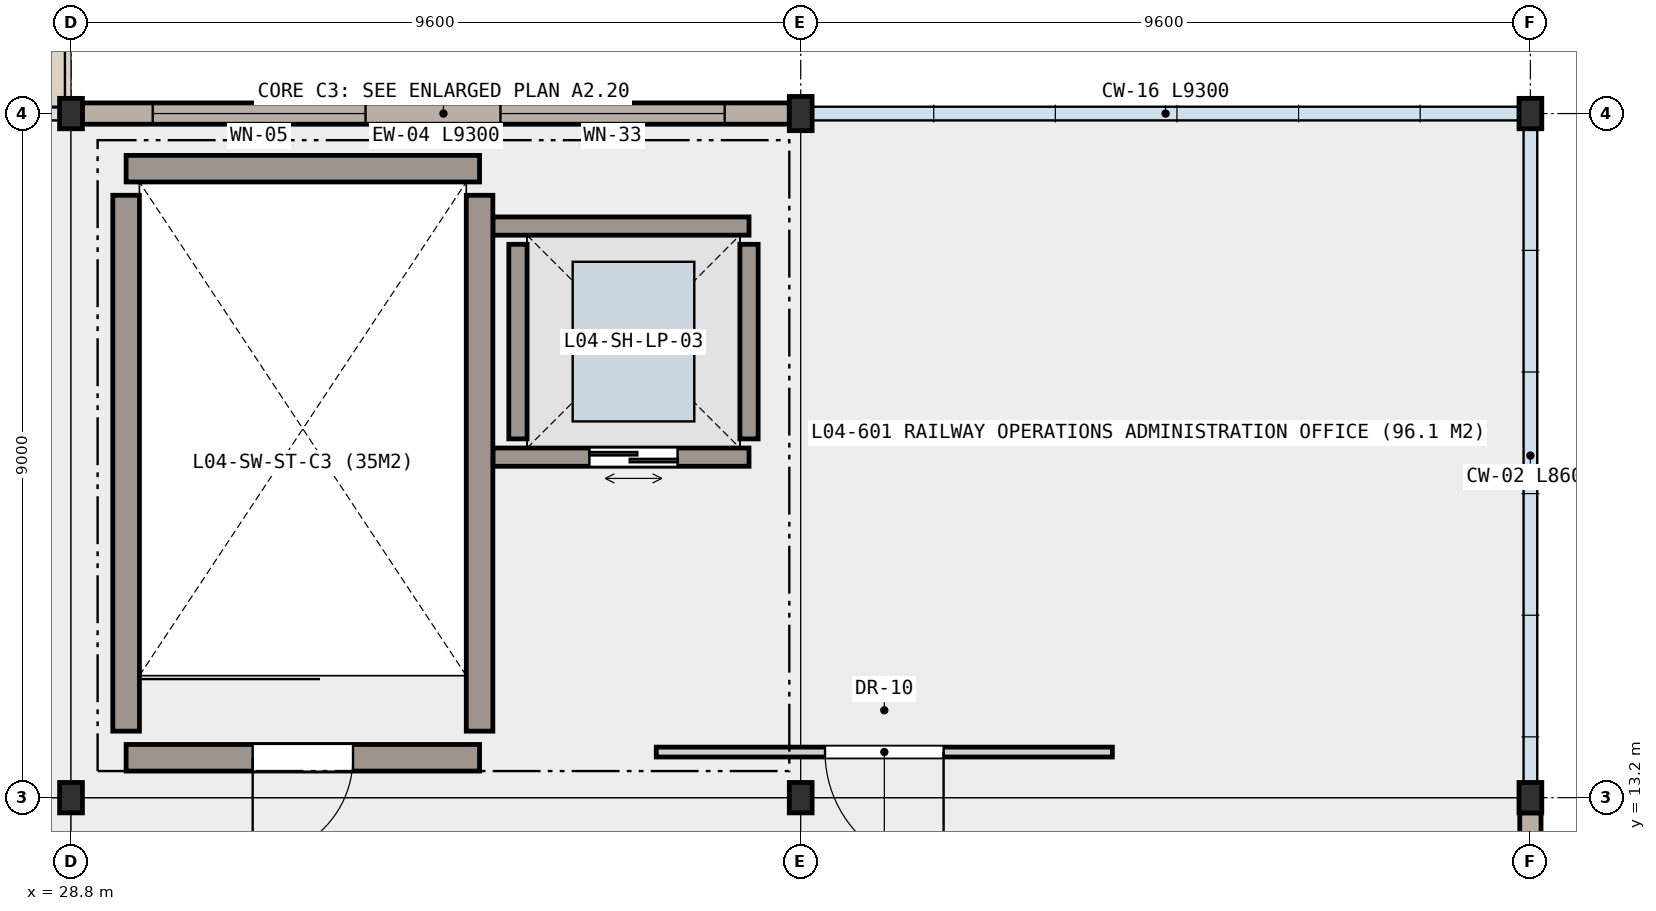
"""IFC4 building model, lengths in metres.
Left out: names, types, materials, properties, quantities, classifications, styles, units other than length and angle.
Written with IfcOpenShell. Run it as: python <this file> out.ifc"""

import sys

from ifc_helpers import new_model, si_unit, direction, frame, frame_2d, origin, origin_2d, place, context, subcontext, project, spatial, rectangle, i_section, extrude, element, fill, save


model = new_model("IFC4")
c1 = context("Model", 3, precision=1e-05, world=origin(), true_north=direction((0.0, 1.0)))
c2 = subcontext(c1, "Body", "Model", "MODEL_VIEW")
j1 = project(units=[si_unit("LENGTHUNIT", "METRE"), si_unit("PLANEANGLEUNIT", "RADIAN")], contexts=[c1])
p1 = place(None, origin())
s1 = spatial("IfcSite", under=j1, at=p1, CompositionType="ELEMENT")
p2 = place(p1, origin())
s2 = spatial("IfcBuilding", under=s1, at=p2, CompositionType="ELEMENT")
p3 = place(p2, frame((0.0, 0.0, 18.6)))
s3 = spatial("IfcBuildingStorey", under=s2, at=p3, CompositionType="ELEMENT", Elevation=18.6)
for number, where, z_axis, x_axis in (
    (1, (28.8, 13.2, 0.0), (0.0, 0.0, 1.0), (1.0, 0.0, 0.0)),
    (2, (28.8, 22.2, 0.0), (0.0, 0.0, 1.0), (1.0, 0.0, 0.0)),
    (3, (38.4, 13.2, 0.0), (0.0, 0.0, 1.0), (1.0, 0.0, 0.0)),
):
    element("IfcColumn", number, at=place(p3, frame(where, z_axis=z_axis, x_axis=x_axis)), inside=s3, PredefinedType="COLUMN", context=c2, shape_type="SweptSolid", body=[
        extrude(i_section(OverallWidth=0.3, OverallDepth=0.4, WebThickness=0.013, FlangeThickness=0.024, FilletRadius=0.027, at=origin_2d()), origin(), (0.0, 0.0, 1.0), 4.2),
    ])
p4 = place(p3, frame((38.4, 22.2, 0.0), z_axis=(0.0, 0.0, 1.0), x_axis=(1.0, 0.0, 0.0)))
e4 = element("IfcColumn", 4, at=p4, inside=s3, PredefinedType="COLUMN", context=c2, shape_type="SweptSolid", body=[
    extrude(i_section(OverallWidth=0.3, OverallDepth=0.45, WebThickness=0.014, FlangeThickness=0.026, FilletRadius=0.027, at=origin_2d()), origin(), (0.0, 0.0, 1.0), 4.2),
])
for number, where, z_axis, x_axis in (
    (5, (48.0, 13.2, 0.0), (0.0, 0.0, 1.0), (1.0, 0.0, 0.0)),
    (6, (48.0, 22.2, 0.0), (0.0, 0.0, 1.0), (1.0, 0.0, 0.0)),
):
    element("IfcColumn", number, at=place(p3, frame(where, z_axis=z_axis, x_axis=x_axis)), inside=s3, PredefinedType="COLUMN", context=c2, shape_type="SweptSolid", body=[
        extrude(i_section(OverallWidth=0.3, OverallDepth=0.4, WebThickness=0.013, FlangeThickness=0.024, FilletRadius=0.027, at=origin_2d()), origin(), (0.0, 0.0, 1.0), 4.2),
    ])
p5 = place(p3, frame((28.95, 22.2, 0.0), z_axis=(0.0, 0.0, 1.0), x_axis=(1.0, 0.0, 0.0)))
e7 = element("IfcWall", 7, at=p5, inside=s3, PredefinedType="SOLIDWALL", context=c2, shape_type="SweptSolid", body=[
    extrude(rectangle(XDim=9.3, YDim=0.28, at=frame_2d((4.65, 0.0))), origin(), (0.0, 0.0, 1.0), 3.33),
])
p6 = place(p5, frame((0.925, 0.0, 0.85)))
e8 = element("IfcOpeningElement", 8, at=p6, cuts=e7, PredefinedType="OPENING", context=c2, shape_type="SweptSolid", body=[
    extrude(rectangle(XDim=2.8, YDim=2.15, at=frame_2d((1.4, 1.075))), frame((0.0, 0.15, 0.0), z_axis=(0.0, -1.0, 0.0), x_axis=(1.0, 0.0, 0.0)), (0.0, 0.0, 1.0), 0.3),
])
p7 = place(p5, frame((5.5, 0.0, 0.85)))
e9 = element("IfcOpeningElement", 9, at=p7, cuts=e7, PredefinedType="OPENING", context=c2, shape_type="SweptSolid", body=[
    extrude(rectangle(XDim=2.95, YDim=1.5, at=frame_2d((1.475, 0.75))), frame((0.0, 0.15, 0.0), z_axis=(0.0, -1.0, 0.0), x_axis=(1.0, 0.0, 0.0)), (0.0, 0.0, 1.0), 0.3),
])
p8 = place(p3, frame((48.0, 13.0, 0.0), z_axis=(0.0, 0.0, 1.0), x_axis=(0.0, -1.0, 0.0)))
e10 = element("IfcWall", 10, at=p8, inside=s3, PredefinedType="SOLIDWALL", context=c2, shape_type="SweptSolid", body=[
    extrude(rectangle(XDim=6.2, YDim=0.28, at=frame_2d((3.1, 0.0))), origin(), (0.0, 0.0, 1.0), 3.57),
])
p9 = place(p8, frame((1.625, 0.0, 0.85)))
e11 = element("IfcOpeningElement", 11, at=p9, cuts=e10, PredefinedType="OPENING", context=c2, shape_type="SweptSolid", body=[
    extrude(rectangle(XDim=2.95, YDim=1.85, at=frame_2d((1.475, 0.925))), frame((0.0, 0.15, 0.0), z_axis=(0.0, -1.0, 0.0), x_axis=(1.0, 0.0, 0.0)), (0.0, 0.0, 1.0), 0.3),
])
p10 = place(p3, frame((37.72, 17.68, 0.0), z_axis=(0.0, 0.0, 1.0), x_axis=(-1.0, 0.0, 0.0)))
e12 = element("IfcWall", 12, at=p10, inside=s3, PredefinedType="SHEAR", context=c2, shape_type="SweptSolid", body=[
    extrude(rectangle(XDim=3.37, YDim=0.24, at=frame_2d((1.685, 0.0))), origin(), (0.0, 0.0, 1.0), 3.96),
])
p11 = place(p10, frame((0.94, 0.0, 0.0)))
e13 = element("IfcOpeningElement", 13, at=p11, cuts=e12, PredefinedType="OPENING", context=c2, shape_type="SweptSolid", body=[
    extrude(rectangle(XDim=1.16, YDim=2.15, at=frame_2d((0.58, 1.075))), frame((0.0, 0.13, 0.0), z_axis=(0.0, -1.0, 0.0), x_axis=(1.0, 0.0, 0.0)), (0.0, 0.0, 1.0), 0.26),
])
p12 = place(p3, frame((34.35, 20.72, 0.0), z_axis=(0.0, 0.0, 1.0), x_axis=(1.0, 0.0, 0.0)))
e14 = element("IfcWall", 14, at=p12, inside=s3, PredefinedType="SHEAR", context=c2, shape_type="SweptSolid", body=[
    extrude(rectangle(XDim=3.37, YDim=0.24, at=frame_2d((1.685, 0.0))), origin(), (0.0, 0.0, 1.0), 3.96),
])
for number, where, z_axis, x_axis in (
    (15, (34.68, 17.92, 0.0), (0.0, 0.0, 1.0), (0.0, 1.0, 0.0)),
    (16, (37.72, 20.48, 0.0), (0.0, 0.0, 1.0), (0.0, -1.0, 0.0)),
):
    element("IfcWall", number, at=place(p3, frame(where, z_axis=z_axis, x_axis=x_axis)), inside=s3, PredefinedType="SHEAR", context=c2, shape_type="SweptSolid", body=[
        extrude(rectangle(XDim=2.56, YDim=0.24, at=frame_2d((1.28, 0.0))), origin(), (0.0, 0.0, 1.0), 3.96),
    ])
p13 = place(p3, frame((34.175, 13.725, 0.0), z_axis=(0.0, 0.0, 1.0), x_axis=(-1.0, 0.0, 0.0)))
e17 = element("IfcWall", 17, at=p13, inside=s3, PredefinedType="SHEAR", context=c2, shape_type="SweptSolid", body=[
    extrude(rectangle(XDim=4.65, YDim=0.35, at=frame_2d((2.325, 0.0))), origin(), (0.0, 0.0, 1.0), 3.96),
])
p14 = place(p13, frame((1.665, 0.0, 0.0)))
e18 = element("IfcOpeningElement", 18, at=p14, cuts=e17, PredefinedType="OPENING", context=c2, shape_type="SweptSolid", body=[
    extrude(rectangle(XDim=1.32, YDim=2.15, at=frame_2d((0.66, 1.075))), frame((0.0, 0.185, 0.0), z_axis=(0.0, -1.0, 0.0), x_axis=(1.0, 0.0, 0.0)), (0.0, 0.0, 1.0), 0.37),
])
p15 = place(p3, frame((29.525, 21.475, 0.0), z_axis=(0.0, 0.0, 1.0), x_axis=(1.0, 0.0, 0.0)))
e19 = element("IfcWall", 19, at=p15, inside=s3, PredefinedType="SHEAR", context=c2, shape_type="SweptSolid", body=[
    extrude(rectangle(XDim=4.65, YDim=0.35, at=frame_2d((2.325, 0.0))), origin(), (0.0, 0.0, 1.0), 3.96),
])
for number, where, z_axis, x_axis in (
    (20, (29.525, 14.075, 0.0), (0.0, 0.0, 1.0), (0.0, 1.0, 0.0)),
    (21, (34.175, 21.125, 0.0), (0.0, 0.0, 1.0), (0.0, -1.0, 0.0)),
):
    element("IfcWall", number, at=place(p3, frame(where, z_axis=z_axis, x_axis=x_axis)), inside=s3, PredefinedType="SHEAR", context=c2, shape_type="SweptSolid", body=[
        extrude(rectangle(XDim=7.05, YDim=0.35, at=frame_2d((3.525, 0.0))), origin(), (0.0, 0.0, 1.0), 3.96),
    ])
p16 = place(p3, frame((42.5, 13.8, 0.0), z_axis=(0.0, 0.0, 1.0), x_axis=(-1.0, 0.0, 0.0)))
e22 = element("IfcWall", 22, at=p16, inside=s3, PredefinedType="PARTITIONING", context=c2, shape_type="SweptSolid", body=[
    extrude(rectangle(XDim=6.0, YDim=0.13, at=frame_2d((3.0, 0.0))), origin(), (0.0, 0.0, 1.0), 3.96),
])
p17 = place(p16, frame((2.22, 0.0, 0.0)))
e23 = element("IfcOpeningElement", 23, at=p17, cuts=e22, PredefinedType="OPENING", context=c2, shape_type="SweptSolid", body=[
    extrude(rectangle(XDim=1.56, YDim=2.2, at=frame_2d((0.78, 1.1))), frame((0.0, 0.075, 0.0), z_axis=(0.0, -1.0, 0.0), x_axis=(1.0, 0.0, 0.0)), (0.0, 0.0, 1.0), 0.15),
])
p18 = place(p6, origin())
e24 = element("IfcWindow", 24, at=p18, inside=s3, PartitioningType="SINGLE_PANEL", PredefinedType="WINDOW", context=c2, shape_type="SweptSolid", body=[
    extrude(rectangle(XDim=2.8, YDim=2.15, at=frame_2d((1.4, 1.075))), frame((0.0, 0.03, 0.0), z_axis=(0.0, -1.0, 0.0), x_axis=(1.0, 0.0, 0.0)), (0.0, 0.0, 1.0), 0.06),
])
fill(e8, e24)
p19 = place(p7, origin())
e25 = element("IfcWindow", 25, at=p19, inside=s3, PartitioningType="SINGLE_PANEL", PredefinedType="WINDOW", context=c2, shape_type="SweptSolid", body=[
    extrude(rectangle(XDim=2.95, YDim=1.5, at=frame_2d((1.475, 0.75))), frame((0.0, 0.03, 0.0), z_axis=(0.0, -1.0, 0.0), x_axis=(1.0, 0.0, 0.0)), (0.0, 0.0, 1.0), 0.06),
])
fill(e9, e25)
p20 = place(p11, origin())
e26 = element("IfcDoor", 26, at=p20, inside=s3, OperationType="DOUBLE_DOOR_SLIDING", PredefinedType="DOOR", context=c2, shape_type="SweptSolid", body=[
    extrude(rectangle(XDim=1.16, YDim=2.15, at=frame_2d((0.58, 1.075))), frame((0.0, 0.025, 0.0), z_axis=(0.0, -1.0, 0.0), x_axis=(1.0, 0.0, 0.0)), (0.0, 0.0, 1.0), 0.05),
])
fill(e13, e26)
p21 = place(p14, origin())
e27 = element("IfcDoor", 27, at=p21, inside=s3, OperationType="SINGLE_SWING_RIGHT", PredefinedType="DOOR", context=c2, shape_type="SweptSolid", body=[
    extrude(rectangle(XDim=1.32, YDim=2.15, at=frame_2d((0.66, 1.075))), frame((0.0, 0.025, 0.0), z_axis=(0.0, -1.0, 0.0), x_axis=(1.0, 0.0, 0.0)), (0.0, 0.0, 1.0), 0.05),
])
fill(e18, e27)
p22 = place(p17, origin())
e28 = element("IfcDoor", 28, at=p22, inside=s3, OperationType="SINGLE_SWING_LEFT", PredefinedType="DOOR", context=c2, shape_type="SweptSolid", body=[
    extrude(rectangle(XDim=1.56, YDim=2.2, at=frame_2d((0.78, 1.1))), frame((0.0, 0.025, 0.0), z_axis=(0.0, -1.0, 0.0), x_axis=(1.0, 0.0, 0.0)), (0.0, 0.0, 1.0), 0.05),
])
fill(e23, e28)
save(model, sys.argv[1])
